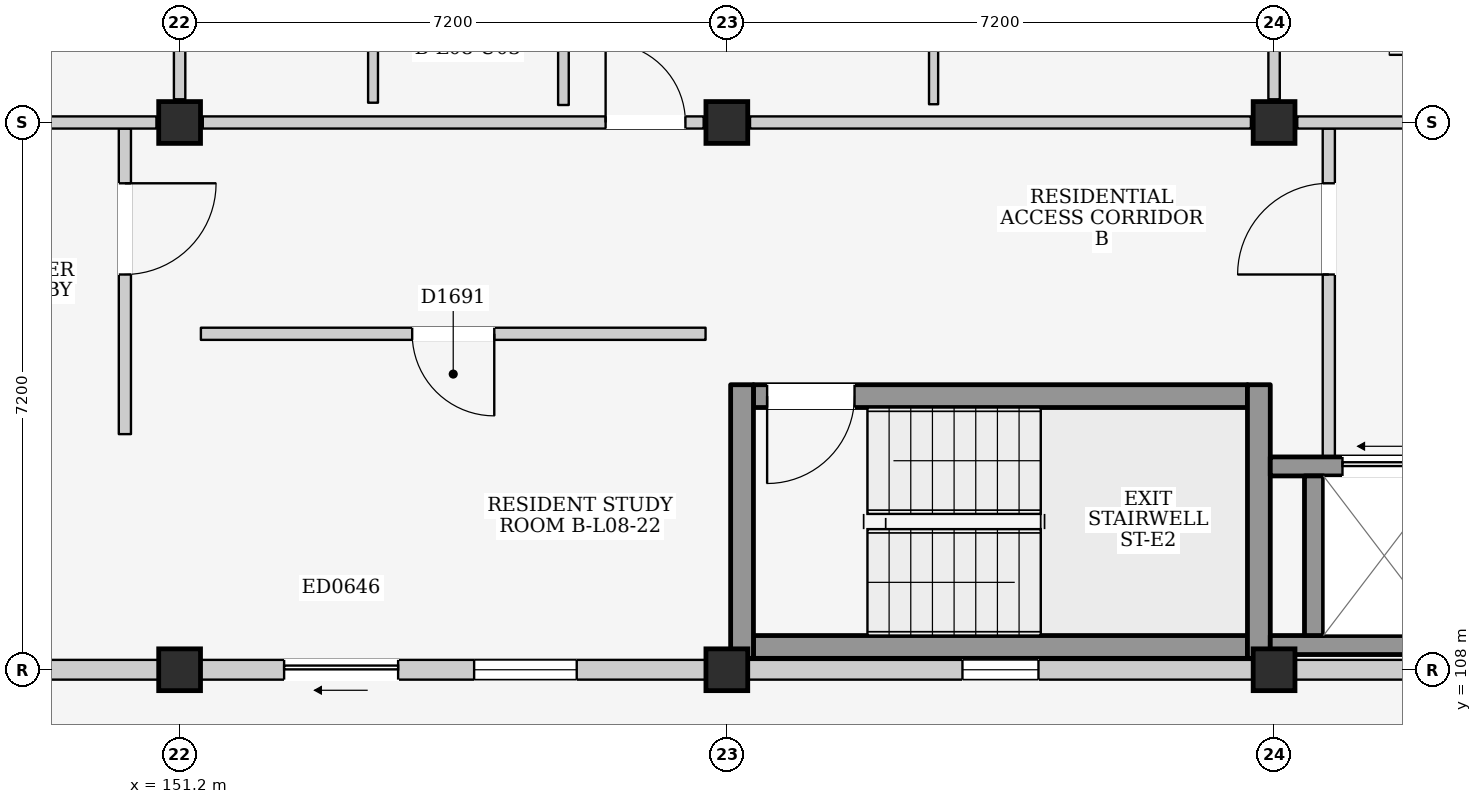
"""IFC4 building model, lengths in metres.
Left out: names, types, materials, properties, quantities, classifications, styles, units other than length and angle.
Written with IfcOpenShell. Run it as: python <this file> out.ifc"""

import sys

from ifc_helpers import new_model, si_unit, direction, frame, frame_2d, origin, origin_2d, place, context, subcontext, project, spatial, rectangle, extrude, element, fill, save


model = new_model("IFC4")
c1 = context("Model", 3, precision=1e-05, world=origin(), true_north=direction((0.0, 1.0)))
c2 = subcontext(c1, "Body", "Model", "MODEL_VIEW")
j1 = project(units=[si_unit("LENGTHUNIT", "METRE"), si_unit("PLANEANGLEUNIT", "RADIAN")], contexts=[c1])
p1 = place(None, origin())
s1 = spatial("IfcSite", under=j1, at=p1, CompositionType="ELEMENT")
p2 = place(p1, origin())
s2 = spatial("IfcBuilding", under=s1, at=p2, CompositionType="ELEMENT")
p3 = place(p2, frame((0.0, 0.0, 28.3)))
s3 = spatial("IfcBuildingStorey", under=s2, at=p3, CompositionType="ELEMENT", Elevation=28.3)
for number, where, z_axis, x_axis in (
    (1, (151.2, 108.0, 0.0), (0.0, 0.0, 1.0), (1.0, 0.0, 0.0)),
    (2, (151.2, 115.2, 0.0), (0.0, 0.0, 1.0), (1.0, 0.0, 0.0)),
    (3, (158.4, 108.0, 0.0), (0.0, 0.0, 1.0), (1.0, 0.0, 0.0)),
    (4, (158.4, 115.2, 0.0), (0.0, 0.0, 1.0), (1.0, 0.0, 0.0)),
    (5, (165.6, 108.0, 0.0), (0.0, 0.0, 1.0), (1.0, 0.0, 0.0)),
    (6, (165.6, 115.2, 0.0), (0.0, 0.0, 1.0), (1.0, 0.0, 0.0)),
):
    element("IfcColumn", number, at=place(p3, frame(where, z_axis=z_axis, x_axis=x_axis)), inside=s3, PredefinedType="COLUMN", context=c2, shape_type="SweptSolid", body=[
        extrude(rectangle(XDim=0.55, YDim=0.55, at=origin_2d()), origin(), (0.0, 0.0, 1.0), 3.2),
    ])
p4 = place(p3, frame((144.275, 108.0, 0.0), z_axis=(0.0, 0.0, 1.0), x_axis=(1.0, 0.0, 0.0)))
e7 = element("IfcWall", 7, at=p4, inside=s3, PredefinedType="ELEMENTEDWALL", context=c2, shape_type="SweptSolid", body=[
    extrude(rectangle(XDim=6.65, YDim=0.26, at=frame_2d((3.325, 0.0))), origin(), (0.0, 0.0, 1.0), 2.335),
])
p5 = place(p4, frame((2.825, 0.0, 1.2)))
e8 = element("IfcOpeningElement", 8, at=p5, cuts=e7, PredefinedType="OPENING", context=c2, shape_type="SweptSolid", body=[
    extrude(rectangle(XDim=1.0, YDim=0.9, at=frame_2d((0.5, 0.45))), frame((0.0, 0.145, 0.0), z_axis=(0.0, -1.0, 0.0), x_axis=(1.0, 0.0, 0.0)), (0.0, 0.0, 1.0), 0.29),
])
p6 = place(p3, frame((151.475, 108.0, 0.0), z_axis=(0.0, 0.0, 1.0), x_axis=(1.0, 0.0, 0.0)))
e9 = element("IfcWall", 9, at=p6, inside=s3, PredefinedType="ELEMENTEDWALL", context=c2, shape_type="SweptSolid", body=[
    extrude(rectangle(XDim=6.65, YDim=0.26, at=frame_2d((3.325, 0.0))), origin(), (0.0, 0.0, 1.0), 2.335),
])
p7 = place(p6, frame((1.1, 0.0, 0.0)))
e10 = element("IfcOpeningElement", 10, at=p7, cuts=e9, PredefinedType="OPENING", context=c2, shape_type="SweptSolid", body=[
    extrude(rectangle(XDim=1.5, YDim=2.12, at=frame_2d((0.75, 1.06))), frame((0.0, 0.145, 0.0), z_axis=(0.0, -1.0, 0.0), x_axis=(1.0, 0.0, 0.0)), (0.0, 0.0, 1.0), 0.29),
])
p8 = place(p6, frame((3.6, 0.0, 0.725)))
e11 = element("IfcOpeningElement", 11, at=p8, cuts=e9, PredefinedType="OPENING", context=c2, shape_type="SweptSolid", body=[
    extrude(rectangle(XDim=1.35, YDim=1.5, at=frame_2d((0.675, 0.75))), frame((0.0, 0.145, 0.0), z_axis=(0.0, -1.0, 0.0), x_axis=(1.0, 0.0, 0.0)), (0.0, 0.0, 1.0), 0.29),
])
p9 = place(p3, frame((158.675, 108.0, 0.0), z_axis=(0.0, 0.0, 1.0), x_axis=(1.0, 0.0, 0.0)))
e12 = element("IfcWall", 12, at=p9, inside=s3, PredefinedType="ELEMENTEDWALL", context=c2, shape_type="SweptSolid", body=[
    extrude(rectangle(XDim=6.65, YDim=0.26, at=frame_2d((3.325, 0.0))), origin(), (0.0, 0.0, 1.0), 2.335),
])
p10 = place(p9, frame((2.825, 0.0, 1.2)))
e13 = element("IfcOpeningElement", 13, at=p10, cuts=e12, PredefinedType="OPENING", context=c2, shape_type="SweptSolid", body=[
    extrude(rectangle(XDim=1.0, YDim=0.9, at=frame_2d((0.5, 0.45))), frame((0.0, 0.145, 0.0), z_axis=(0.0, -1.0, 0.0), x_axis=(1.0, 0.0, 0.0)), (0.0, 0.0, 1.0), 0.29),
])
p11 = place(p3, frame((165.875, 108.0, 0.0), z_axis=(0.0, 0.0, 1.0), x_axis=(1.0, 0.0, 0.0)))
e14 = element("IfcWall", 14, at=p11, inside=s3, PredefinedType="ELEMENTEDWALL", context=c2, shape_type="SweptSolid", body=[
    extrude(rectangle(XDim=6.65, YDim=0.26, at=frame_2d((3.325, 0.0))), origin(), (0.0, 0.0, 1.0), 2.335),
])
p12 = place(p11, frame((2.825, 0.0, 1.2)))
e15 = element("IfcOpeningElement", 15, at=p12, cuts=e14, PredefinedType="OPENING", context=c2, shape_type="SweptSolid", body=[
    extrude(rectangle(XDim=1.0, YDim=0.9, at=frame_2d((0.5, 0.45))), frame((0.0, 0.145, 0.0), z_axis=(0.0, -1.0, 0.0), x_axis=(1.0, 0.0, 0.0)), (0.0, 0.0, 1.0), 0.29),
])
p13 = place(p3, frame((150.48, 111.1, 0.0), z_axis=(0.0, 0.0, 1.0), x_axis=(0.0, 1.0, 0.0)))
e16 = element("IfcWall", 16, at=p13, inside=s3, PredefinedType="PARTITIONING", context=c2, shape_type="SweptSolid", body=[
    extrude(rectangle(XDim=4.02, YDim=0.16, at=frame_2d((2.01, 0.0))), origin(), (0.0, 0.0, 1.0), 2.95),
])
p14 = place(p13, frame((2.1, 0.0, 0.0)))
e17 = element("IfcOpeningElement", 17, at=p14, cuts=e16, PredefinedType="OPENING", context=c2, shape_type="SweptSolid", body=[
    extrude(rectangle(XDim=1.2, YDim=2.2, at=frame_2d((0.6, 1.1))), frame((0.0, 0.095, 0.0), z_axis=(0.0, -1.0, 0.0), x_axis=(1.0, 0.0, 0.0)), (0.0, 0.0, 1.0), 0.19),
])
p15 = place(p3, frame((158.75, 108.3, 0.0), z_axis=(0.0, 0.0, 1.0), x_axis=(1.0, 0.0, 0.0)))
e18 = element("IfcWall", 18, at=p15, inside=s3, PredefinedType="SHEAR", context=c2, shape_type="SweptSolid", body=[
    extrude(rectangle(XDim=6.5, YDim=0.3, at=frame_2d((3.25, 0.0))), origin(), (0.0, 0.0, 1.0), 2.95),
])
p16 = place(p3, frame((158.75, 111.6, 0.0), z_axis=(0.0, 0.0, 1.0), x_axis=(1.0, 0.0, 0.0)))
e19 = element("IfcWall", 19, at=p16, inside=s3, PredefinedType="SHEAR", context=c2, shape_type="SweptSolid", body=[
    extrude(rectangle(XDim=6.5, YDim=0.3, at=frame_2d((3.25, 0.0))), origin(), (0.0, 0.0, 1.0), 2.95),
])
p17 = place(p16, frame((0.18, 0.0, 0.0)))
e20 = element("IfcOpeningElement", 20, at=p17, cuts=e19, PredefinedType="OPENING", context=c2, shape_type="SweptSolid", body=[
    extrude(rectangle(XDim=1.15, YDim=2.2, at=frame_2d((0.575, 1.1))), frame((0.0, 0.165, 0.0), z_axis=(0.0, -1.0, 0.0), x_axis=(1.0, 0.0, 0.0)), (0.0, 0.0, 1.0), 0.33),
])
for number, where, z_axis, x_axis in (
    (21, (158.6, 108.15, 0.0), (0.0, 0.0, 1.0), (0.0, 1.0, 0.0)),
    (22, (165.4, 108.15, 0.0), (0.0, 0.0, 1.0), (0.0, 1.0, 0.0)),
):
    element("IfcWall", number, at=place(p3, frame(where, z_axis=z_axis, x_axis=x_axis)), inside=s3, PredefinedType="SHEAR", context=c2, shape_type="SweptSolid", body=[
        extrude(rectangle(XDim=3.6, YDim=0.3, at=frame_2d((1.8, 0.0))), origin(), (0.0, 0.0, 1.0), 2.95),
    ])
p18 = place(p3, frame((166.32, 110.8, 0.0), z_axis=(0.0, 0.0, 1.0), x_axis=(0.0, 1.0, 0.0)))
e23 = element("IfcWall", 23, at=p18, inside=s3, PredefinedType="PARTITIONING", context=c2, shape_type="SweptSolid", body=[
    extrude(rectangle(XDim=4.32, YDim=0.16, at=frame_2d((2.16, 0.0))), origin(), (0.0, 0.0, 1.0), 2.95),
])
p19 = place(p18, frame((2.4, 0.0, 0.0)))
e24 = element("IfcOpeningElement", 24, at=p19, cuts=e23, PredefinedType="OPENING", context=c2, shape_type="SweptSolid", body=[
    extrude(rectangle(XDim=1.2, YDim=2.2, at=frame_2d((0.6, 1.1))), frame((0.0, 0.095, 0.0), z_axis=(0.0, -1.0, 0.0), x_axis=(1.0, 0.0, 0.0)), (0.0, 0.0, 1.0), 0.19),
])
p20 = place(p3, frame((165.55, 108.325, 0.0), z_axis=(0.0, 0.0, 1.0), x_axis=(1.0, 0.0, 0.0)))
e25 = element("IfcWall", 25, at=p20, inside=s3, PredefinedType="SHEAR", context=c2, shape_type="SweptSolid", body=[
    extrude(rectangle(XDim=2.55, YDim=0.25, at=frame_2d((1.275, 0.0))), origin(), (0.0, 0.0, 1.0), 2.95),
])
p21 = place(p3, frame((165.55, 110.675, 0.0), z_axis=(0.0, 0.0, 1.0), x_axis=(1.0, 0.0, 0.0)))
e26 = element("IfcWall", 26, at=p21, inside=s3, PredefinedType="SHEAR", context=c2, shape_type="SweptSolid", body=[
    extrude(rectangle(XDim=2.55, YDim=0.25, at=frame_2d((1.275, 0.0))), origin(), (0.0, 0.0, 1.0), 2.95),
])
p22 = place(p21, frame((0.95, 0.0, 0.0)))
e27 = element("IfcOpeningElement", 27, at=p22, cuts=e26, PredefinedType="OPENING", context=c2, shape_type="SweptSolid", body=[
    extrude(rectangle(XDim=1.1, YDim=2.15, at=frame_2d((0.55, 1.075))), frame((0.0, 0.14, 0.0), z_axis=(0.0, -1.0, 0.0), x_axis=(1.0, 0.0, 0.0)), (0.0, 0.0, 1.0), 0.28),
])
p23 = place(p3, frame((166.125, 108.45, 0.0), z_axis=(0.0, 0.0, 1.0), x_axis=(0.0, 1.0, 0.0)))
e28 = element("IfcWall", 28, at=p23, inside=s3, PredefinedType="SHEAR", context=c2, shape_type="SweptSolid", body=[
    extrude(rectangle(XDim=2.1, YDim=0.25, at=frame_2d((1.05, 0.0))), origin(), (0.0, 0.0, 1.0), 2.95),
])
p24 = place(p3, frame((144.305, 115.2, 0.0), z_axis=(0.0, 0.0, 1.0), x_axis=(1.0, 0.0, 0.0)))
e29 = element("IfcWall", 29, at=p24, inside=s3, PredefinedType="PARTITIONING", context=c2, shape_type="SweptSolid", body=[
    extrude(rectangle(XDim=6.59, YDim=0.16, at=frame_2d((3.295, 0.0))), origin(), (0.0, 0.0, 1.0), 2.335),
])
p25 = place(p24, frame((4.12, 0.0, 0.0)))
e30 = element("IfcOpeningElement", 30, at=p25, cuts=e29, PredefinedType="OPENING", context=c2, shape_type="SweptSolid", body=[
    extrude(rectangle(XDim=1.05, YDim=2.15, at=frame_2d((0.525, 1.075))), frame((0.0, 0.095, 0.0), z_axis=(0.0, -1.0, 0.0), x_axis=(1.0, 0.0, 0.0)), (0.0, 0.0, 1.0), 0.19),
])
p26 = place(p3, frame((151.2, 115.505, 0.0), z_axis=(0.0, 0.0, 1.0), x_axis=(0.0, 1.0, 0.0)))
e31 = element("IfcWall", 31, at=p26, inside=s3, PredefinedType="PARTITIONING", context=c2, shape_type="SweptSolid", body=[
    extrude(rectangle(XDim=6.59, YDim=0.15, at=frame_2d((3.295, 0.0))), origin(), (0.0, 0.0, 1.0), 2.435),
])
p27 = place(p3, frame((151.505, 115.2, 0.0), z_axis=(0.0, 0.0, 1.0), x_axis=(1.0, 0.0, 0.0)))
e32 = element("IfcWall", 32, at=p27, inside=s3, PredefinedType="PARTITIONING", context=c2, shape_type="SweptSolid", body=[
    extrude(rectangle(XDim=6.59, YDim=0.16, at=frame_2d((3.295, 0.0))), origin(), (0.0, 0.0, 1.0), 2.335),
])
p28 = place(p27, frame((5.3, 0.0, 0.0)))
e33 = element("IfcOpeningElement", 33, at=p28, cuts=e32, PredefinedType="OPENING", context=c2, shape_type="SweptSolid", body=[
    extrude(rectangle(XDim=1.05, YDim=2.15, at=frame_2d((0.525, 1.075))), frame((0.0, 0.095, 0.0), z_axis=(0.0, -1.0, 0.0), x_axis=(1.0, 0.0, 0.0)), (0.0, 0.0, 1.0), 0.19),
])
p29 = place(p3, frame((158.705, 115.2, 0.0), z_axis=(0.0, 0.0, 1.0), x_axis=(1.0, 0.0, 0.0)))
e34 = element("IfcWall", 34, at=p29, inside=s3, PredefinedType="PARTITIONING", context=c2, shape_type="SweptSolid", body=[
    extrude(rectangle(XDim=6.59, YDim=0.16, at=frame_2d((3.295, 0.0))), origin(), (0.0, 0.0, 1.0), 2.335),
])
p30 = place(p3, frame((165.6, 115.505, 0.0), z_axis=(0.0, 0.0, 1.0), x_axis=(0.0, 1.0, 0.0)))
e35 = element("IfcWall", 35, at=p30, inside=s3, PredefinedType="PARTITIONING", context=c2, shape_type="SweptSolid", body=[
    extrude(rectangle(XDim=6.59, YDim=0.15, at=frame_2d((3.295, 0.0))), origin(), (0.0, 0.0, 1.0), 2.435),
])
p31 = place(p3, frame((153.745, 115.46, 0.0), z_axis=(0.0, 0.0, 1.0), x_axis=(0.0, 1.0, 0.0)))
e36 = element("IfcWall", 36, at=p31, inside=s3, PredefinedType="PARTITIONING", context=c2, shape_type="SweptSolid", body=[
    extrude(rectangle(XDim=3.04, YDim=0.13, at=frame_2d((1.52, 0.0))), origin(), (0.0, 0.0, 1.0), 2.95),
])
p32 = place(p3, frame((156.25, 115.43, 0.0), z_axis=(0.0, 0.0, 1.0), x_axis=(0.0, 1.0, 0.0)))
e37 = element("IfcWall", 37, at=p32, inside=s3, PredefinedType="PARTITIONING", context=c2, shape_type="SweptSolid", body=[
    extrude(rectangle(XDim=3.06, YDim=0.14, at=frame_2d((1.53, 0.0))), origin(), (0.0, 0.0, 1.0), 2.95),
])
p33 = place(p3, frame((161.12, 115.44, 0.0), z_axis=(0.0, 0.0, 1.0), x_axis=(0.0, 1.0, 0.0)))
e38 = element("IfcWall", 38, at=p33, inside=s3, PredefinedType="PARTITIONING", context=c2, shape_type="SweptSolid", body=[
    extrude(rectangle(XDim=3.04, YDim=0.12, at=frame_2d((1.52, 0.0))), origin(), (0.0, 0.0, 1.0), 2.95),
])
p34 = place(p33, frame((1.04, 0.0, 0.0)))
e39 = element("IfcOpeningElement", 39, at=p34, cuts=e38, PredefinedType="OPENING", context=c2, shape_type="SweptSolid", body=[
    extrude(rectangle(XDim=0.96, YDim=2.15, at=frame_2d((0.48, 1.075))), frame((0.0, 0.075, 0.0), z_axis=(0.0, -1.0, 0.0), x_axis=(1.0, 0.0, 0.0)), (0.0, 0.0, 1.0), 0.15),
])
p35 = place(p3, frame((165.905, 115.2, 0.0), z_axis=(0.0, 0.0, 1.0), x_axis=(1.0, 0.0, 0.0)))
e40 = element("IfcWall", 40, at=p35, inside=s3, PredefinedType="PARTITIONING", context=c2, shape_type="SweptSolid", body=[
    extrude(rectangle(XDim=6.59, YDim=0.16, at=frame_2d((3.295, 0.0))), origin(), (0.0, 0.0, 1.0), 2.335),
])
p36 = place(p35, frame((4.12, 0.0, 0.0)))
e41 = element("IfcOpeningElement", 41, at=p36, cuts=e40, PredefinedType="OPENING", context=c2, shape_type="SweptSolid", body=[
    extrude(rectangle(XDim=1.05, YDim=2.15, at=frame_2d((0.525, 1.075))), frame((0.0, 0.095, 0.0), z_axis=(0.0, -1.0, 0.0), x_axis=(1.0, 0.0, 0.0)), (0.0, 0.0, 1.0), 0.19),
])
p37 = place(p3, frame((151.48, 112.42, 0.0), z_axis=(0.0, 0.0, 1.0), x_axis=(1.0, 0.0, 0.0)))
e42 = element("IfcWall", 42, at=p37, inside=s3, PredefinedType="PARTITIONING", context=c2, shape_type="SweptSolid", body=[
    extrude(rectangle(XDim=6.64, YDim=0.16, at=frame_2d((3.32, 0.0))), origin(), (0.0, 0.0, 1.0), 2.95),
])
p38 = place(p37, frame((2.78, 0.0, 0.0)))
e43 = element("IfcOpeningElement", 43, at=p38, cuts=e42, PredefinedType="OPENING", context=c2, shape_type="SweptSolid", body=[
    extrude(rectangle(XDim=1.08, YDim=2.22, at=frame_2d((0.54, 1.11))), frame((0.0, 0.095, 0.0), z_axis=(0.0, -1.0, 0.0), x_axis=(1.0, 0.0, 0.0)), (0.0, 0.0, 1.0), 0.19),
])
p39 = place(p7, frame((1.5, 0.0, 0.0), z_axis=(0.0, 0.0, 1.0), x_axis=(-1.0, 0.0, 0.0)))
e44 = element("IfcDoor", 44, at=p39, inside=s3, OperationType="SLIDING_TO_LEFT", PredefinedType="DOOR", context=c2, shape_type="SweptSolid", body=[
    extrude(rectangle(XDim=1.5, YDim=2.12, at=frame_2d((0.75, 1.06))), frame((0.0, 0.025, 0.0), z_axis=(0.0, -1.0, 0.0), x_axis=(1.0, 0.0, 0.0)), (0.0, 0.0, 1.0), 0.05),
])
fill(e10, e44)
p40 = place(p8, origin())
e45 = element("IfcWindow", 45, at=p40, inside=s3, PartitioningType="SINGLE_PANEL", PredefinedType="WINDOW", context=c2, shape_type="SweptSolid", body=[
    extrude(rectangle(XDim=1.35, YDim=1.5, at=frame_2d((0.675, 0.75))), frame((0.0, 0.03, 0.0), z_axis=(0.0, -1.0, 0.0), x_axis=(1.0, 0.0, 0.0)), (0.0, 0.0, 1.0), 0.06),
])
fill(e11, e45)
p41 = place(p10, origin())
e46 = element("IfcWindow", 46, at=p41, inside=s3, PartitioningType="SINGLE_PANEL", PredefinedType="WINDOW", context=c2, shape_type="SweptSolid", body=[
    extrude(rectangle(XDim=1.0, YDim=0.9, at=frame_2d((0.5, 0.45))), frame((0.0, 0.03, 0.0), z_axis=(0.0, -1.0, 0.0), x_axis=(1.0, 0.0, 0.0)), (0.0, 0.0, 1.0), 0.06),
])
fill(e13, e46)
p42 = place(p14, frame((1.2, 0.0, 0.0), z_axis=(0.0, 0.0, 1.0), x_axis=(-1.0, 0.0, 0.0)))
e47 = element("IfcDoor", 47, at=p42, inside=s3, OperationType="SINGLE_SWING_LEFT", PredefinedType="DOOR", context=c2, shape_type="SweptSolid", body=[
    extrude(rectangle(XDim=1.2, YDim=2.2, at=frame_2d((0.6, 1.1))), frame((0.0, 0.025, 0.0), z_axis=(0.0, -1.0, 0.0), x_axis=(1.0, 0.0, 0.0)), (0.0, 0.0, 1.0), 0.05),
])
fill(e17, e47)
p43 = place(p17, frame((1.15, 0.0, 0.0), z_axis=(0.0, 0.0, 1.0), x_axis=(-1.0, 0.0, 0.0)))
e48 = element("IfcDoor", 48, at=p43, inside=s3, OperationType="SINGLE_SWING_RIGHT", PredefinedType="DOOR", context=c2, shape_type="SweptSolid", body=[
    extrude(rectangle(XDim=1.15, YDim=2.2, at=frame_2d((0.575, 1.1))), frame((0.0, 0.025, 0.0), z_axis=(0.0, -1.0, 0.0), x_axis=(1.0, 0.0, 0.0)), (0.0, 0.0, 1.0), 0.05),
])
fill(e20, e48)
p44 = place(p19, origin())
e49 = element("IfcDoor", 49, at=p44, inside=s3, OperationType="SINGLE_SWING_LEFT", PredefinedType="DOOR", context=c2, shape_type="SweptSolid", body=[
    extrude(rectangle(XDim=1.2, YDim=2.2, at=frame_2d((0.6, 1.1))), frame((0.0, 0.025, 0.0), z_axis=(0.0, -1.0, 0.0), x_axis=(1.0, 0.0, 0.0)), (0.0, 0.0, 1.0), 0.05),
])
fill(e24, e49)
p45 = place(p22, origin())
e50 = element("IfcDoor", 50, at=p45, inside=s3, OperationType="SLIDING_TO_LEFT", PredefinedType="DOOR", context=c2, shape_type="SweptSolid", body=[
    extrude(rectangle(XDim=1.1, YDim=2.15, at=frame_2d((0.55, 1.075))), frame((0.0, 0.025, 0.0), z_axis=(0.0, -1.0, 0.0), x_axis=(1.0, 0.0, 0.0)), (0.0, 0.0, 1.0), 0.05),
])
fill(e27, e50)
p46 = place(p28, origin())
e51 = element("IfcDoor", 51, at=p46, inside=s3, OperationType="SINGLE_SWING_LEFT", PredefinedType="DOOR", context=c2, shape_type="SweptSolid", body=[
    extrude(rectangle(XDim=1.05, YDim=2.15, at=frame_2d((0.525, 1.075))), frame((0.0, 0.025, 0.0), z_axis=(0.0, -1.0, 0.0), x_axis=(1.0, 0.0, 0.0)), (0.0, 0.0, 1.0), 0.05),
])
fill(e33, e51)
p47 = place(p38, frame((1.08, 0.0, 0.0), z_axis=(0.0, 0.0, 1.0), x_axis=(-1.0, 0.0, 0.0)))
e52 = element("IfcDoor", 52, at=p47, inside=s3, OperationType="SINGLE_SWING_LEFT", PredefinedType="DOOR", context=c2, shape_type="SweptSolid", body=[
    extrude(rectangle(XDim=1.08, YDim=2.22, at=frame_2d((0.54, 1.11))), frame((0.0, 0.025, 0.0), z_axis=(0.0, -1.0, 0.0), x_axis=(1.0, 0.0, 0.0)), (0.0, 0.0, 1.0), 0.05),
])
fill(e43, e52)
save(model, sys.argv[1])
